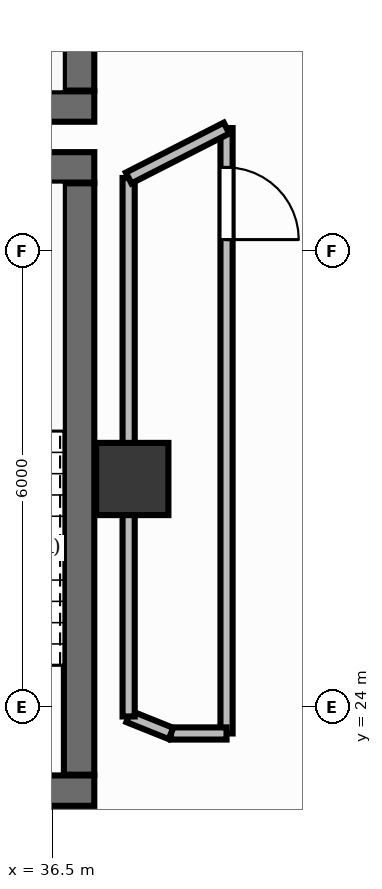
"""IFC4 building model, lengths in metres.
Left out: names, types, materials, properties, quantities, classifications, styles, units other than length and angle.
Written with IfcOpenShell. Run it as: python <this file> out.ifc"""

import sys

from ifc_helpers import new_model, si_unit, direction, frame, frame_2d, origin, origin_2d, place, context, subcontext, project, spatial, rectangle, extrude, element, fill, save


model = new_model("IFC4")
c1 = context("Model", 3, precision=1e-05, world=origin(), true_north=direction((0.0, 1.0)))
c2 = subcontext(c1, "Body", "Model", "MODEL_VIEW")
j1 = project(units=[si_unit("LENGTHUNIT", "METRE"), si_unit("PLANEANGLEUNIT", "RADIAN")], contexts=[c1])
p1 = place(None, origin())
s1 = spatial("IfcSite", under=j1, at=p1, CompositionType="ELEMENT")
p2 = place(p1, origin())
s2 = spatial("IfcBuilding", under=s1, at=p2, CompositionType="ELEMENT")
p3 = place(p2, frame((0.0, 0.0, 252.0)))
s3 = spatial("IfcBuildingStorey", under=s2, at=p3, CompositionType="ELEMENT", Elevation=252.0)
p4 = place(p3, frame((28.4, 31.9, 0.0), z_axis=(0.0, 0.0, 1.0), x_axis=(1.0, 0.0, 0.0)))
e1 = element("IfcWall", 1, at=p4, inside=s3, PredefinedType="SHEAR", context=c2, shape_type="SweptSolid", body=[
    extrude(rectangle(XDim=8.65, YDim=0.4, at=frame_2d((4.325, 0.0))), origin(), (0.0, 0.0, 1.0), 3.9),
])
p5 = place(p3, frame((36.85, 32.11, 0.0), z_axis=(0.0, 0.0, 1.0), x_axis=(0.0, 1.0, 0.0)))
e2 = element("IfcWall", 2, at=p5, inside=s3, PredefinedType="SHEAR", context=c2, shape_type="SweptSolid", body=[
    extrude(rectangle(XDim=3.08, YDim=0.4, at=frame_2d((1.54, 0.0))), origin(), (0.0, 0.0, 1.0), 3.9),
])
for number, where, z_axis, x_axis in (
    (3, (33.15, 31.1, 0.0), (0.0, 0.0, 1.0), (1.0, 0.0, 0.0)),
    (4, (33.15, 22.9, 0.0), (0.0, 0.0, 1.0), (1.0, 0.0, 0.0)),
):
    element("IfcWall", number, at=place(p3, frame(where, z_axis=z_axis, x_axis=x_axis)), inside=s3, PredefinedType="SHEAR", context=c2, shape_type="SweptSolid", body=[
        extrude(rectangle(XDim=3.9, YDim=0.4, at=frame_2d((1.95, 0.0))), origin(), (0.0, 0.0, 1.0), 3.9),
    ])
p6 = place(p3, frame((36.85, 23.11, 0.0), z_axis=(0.0, 0.0, 1.0), x_axis=(0.0, 1.0, 0.0)))
e5 = element("IfcWall", 5, at=p6, inside=s3, PredefinedType="SHEAR", context=c2, shape_type="SweptSolid", body=[
    extrude(rectangle(XDim=7.78, YDim=0.4, at=frame_2d((3.89, 0.0))), origin(), (0.0, 0.0, 1.0), 3.9),
])
p7 = place(p3, frame((37.55, 27.0, -0.0), z_axis=(0.0, 0.0, 1.0), x_axis=(1.0, 0.0, 0.0)))
e6 = element("IfcColumn", 6, at=p7, inside=s3, PredefinedType="PILASTER", context=c2, shape_type="SweptSolid", body=[
    extrude(rectangle(XDim=0.95, YDim=0.95, at=origin_2d()), origin(), (0.0, 0.0, 1.0), 3.901),
])
p8 = place(p3, frame((38.79, 31.617, 0.0), z_axis=(0.0, 0.0, 1.0), x_axis=(0.0, -1.0, 0.0)))
e7 = element("IfcWall", 7, at=p8, inside=s3, PredefinedType="PARTITIONING", context=c2, shape_type="SweptSolid", body=[
    extrude(rectangle(XDim=7.965, YDim=0.16, at=frame_2d((3.982, 0.0))), origin(), (0.0, 0.0, 1.0), 2.91),
])
p9 = place(p8, frame((0.517, 0.0, 0.0)))
e8 = element("IfcOpeningElement", 8, at=p9, cuts=e7, PredefinedType="OPENING", context=c2, shape_type="SweptSolid", body=[
    extrude(rectangle(XDim=0.95, YDim=2.15, at=frame_2d((0.475, 1.075))), frame((0.0, 0.095, 0.0), z_axis=(0.0, -1.0, 0.0), x_axis=(1.0, 0.0, 0.0)), (0.0, 0.0, 1.0), 0.19),
])
p10 = place(p3, frame((37.502, 26.921, 0.0), z_axis=(0.0, 0.0, 1.0), x_axis=(0.0, 1.0, 0.0)))
e9 = element("IfcWall", 9, at=p10, inside=s3, PredefinedType="PARTITIONING", context=c2, shape_type="SweptSolid", body=[
    extrude(rectangle(XDim=4.04, YDim=0.16, at=frame_2d((2.02, 0.0))), origin(), (0.0, 0.0, 1.0), 2.91),
])
p11 = place(p3, frame((37.502, 30.96, 0.0), z_axis=(0.0, 0.0, 1.0), x_axis=(0.890920886731, 0.454158533539, 0.0)))
e10 = element("IfcWall", 10, at=p11, inside=s3, PredefinedType="PARTITIONING", context=c2, shape_type="SweptSolid", body=[
    extrude(rectangle(XDim=1.446, YDim=0.16, at=frame_2d((0.723, 0.0))), origin(), (0.0, 0.0, 1.0), 2.91),
])
p12 = place(p3, frame((38.79, 23.652, 0.0), z_axis=(0.0, 0.0, 1.0), x_axis=(-1.0, 0.0, 0.0)))
e11 = element("IfcWall", 11, at=p12, inside=s3, PredefinedType="PARTITIONING", context=c2, shape_type="SweptSolid", body=[
    extrude(rectangle(XDim=0.731, YDim=0.16, at=frame_2d((0.365, 0.0))), origin(), (0.0, 0.0, 1.0), 2.91),
])
p13 = place(p3, frame((38.059, 23.652, 0.0), z_axis=(0.0, 0.0, 1.0), x_axis=(-0.92791427864, 0.372793631243, 0.0)))
e12 = element("IfcWall", 12, at=p13, inside=s3, PredefinedType="PARTITIONING", context=c2, shape_type="SweptSolid", body=[
    extrude(rectangle(XDim=0.6, YDim=0.16, at=frame_2d((0.3, 0.0))), origin(), (0.0, 0.0, 1.0), 2.91),
])
p14 = place(p3, frame((37.502, 23.876, 0.0), z_axis=(0.0, 0.0, 1.0), x_axis=(0.0, 1.0, 0.0)))
e13 = element("IfcWall", 13, at=p14, inside=s3, PredefinedType="PARTITIONING", context=c2, shape_type="SweptSolid", body=[
    extrude(rectangle(XDim=3.041, YDim=0.16, at=frame_2d((1.52, 0.0))), origin(), (0.0, 0.0, 1.0), 2.91),
])
p15 = place(p9, origin())
e14 = element("IfcDoor", 14, at=p15, inside=s3, OperationType="SINGLE_SWING_RIGHT", PredefinedType="DOOR", context=c2, shape_type="SweptSolid", body=[
    extrude(rectangle(XDim=0.95, YDim=2.15, at=frame_2d((0.475, 1.075))), frame((0.0, 0.025, 0.0), z_axis=(0.0, -1.0, 0.0), x_axis=(1.0, 0.0, 0.0)), (0.0, 0.0, 1.0), 0.05),
])
fill(e8, e14)
save(model, sys.argv[1])
